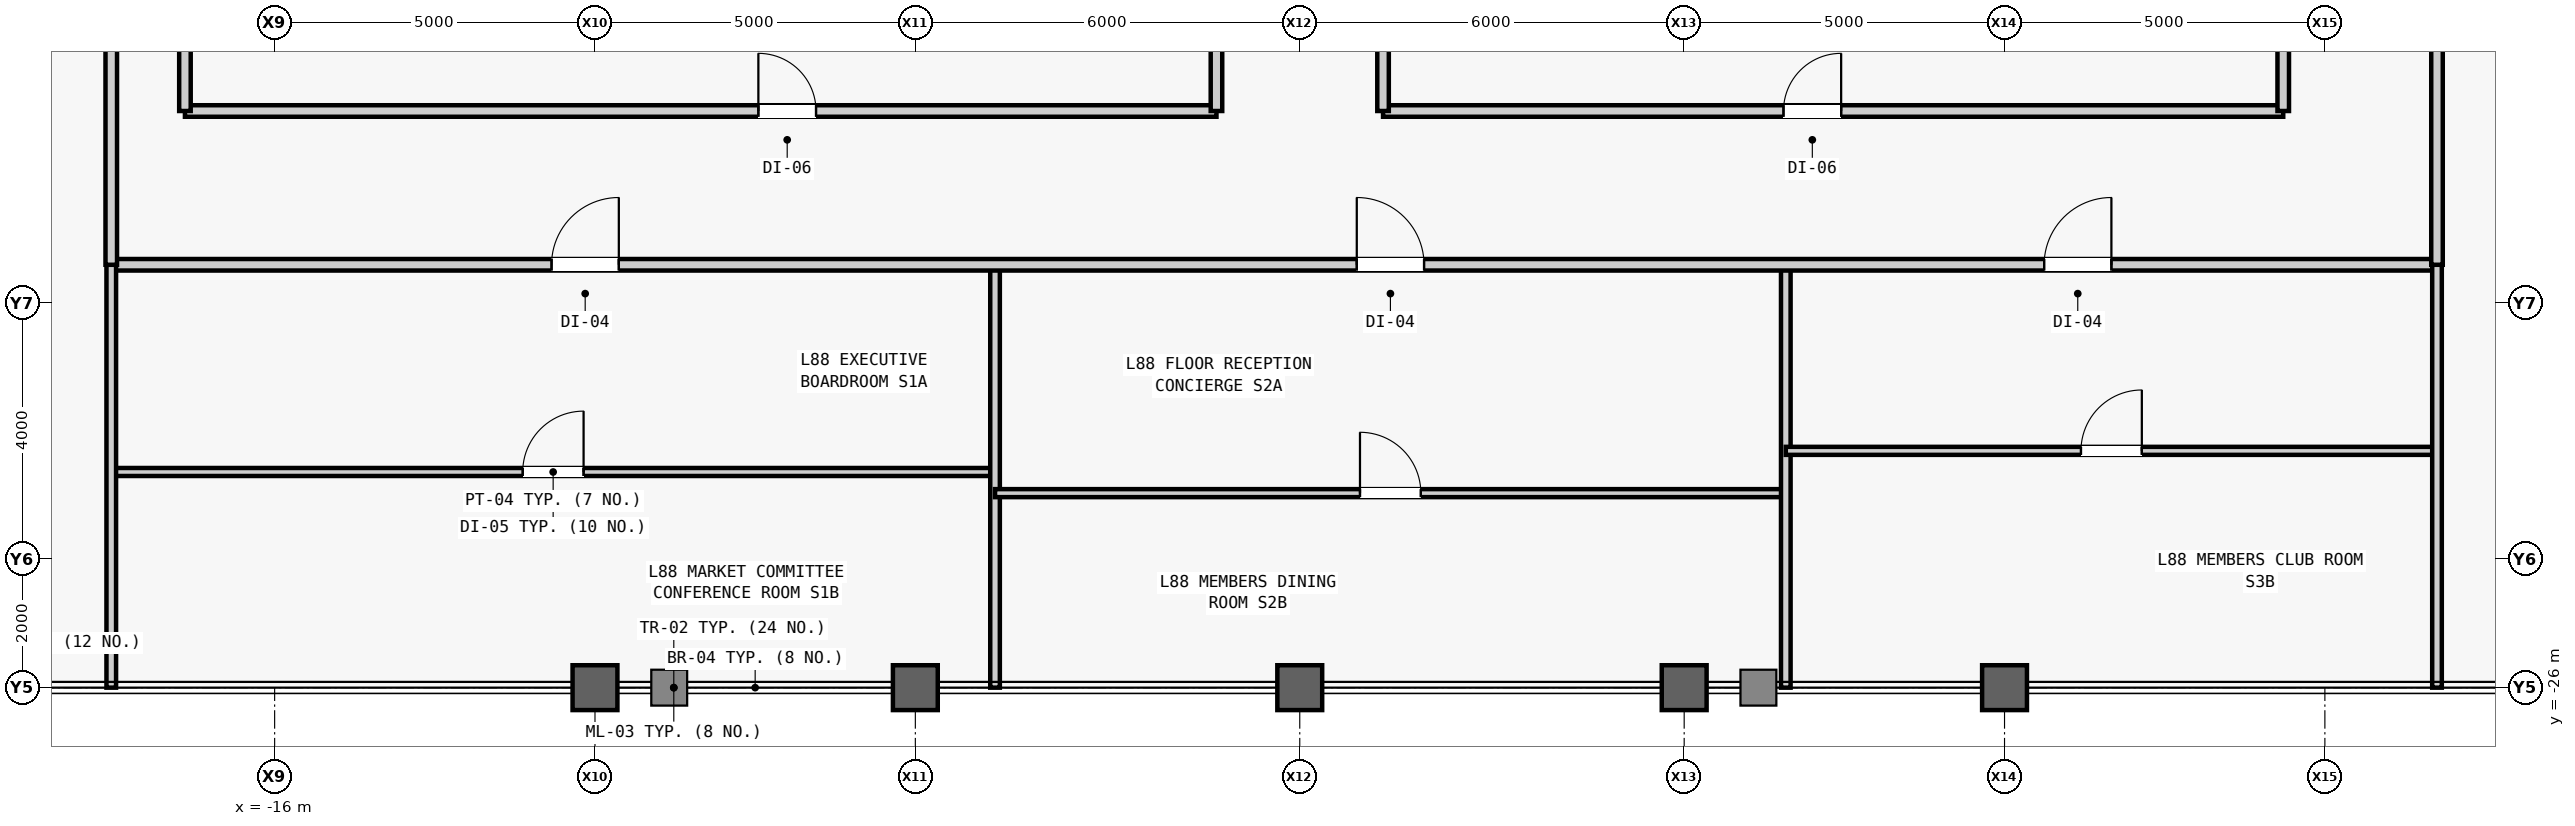
"""IFC4 building model, lengths in metres.
Left out: names, types, materials, properties, quantities, classifications, styles, units other than length and angle.
Written with IfcOpenShell. Run it as: python <this file> out.ifc"""

import sys

from ifc_helpers import new_model, si_unit, direction, frame, frame_2d, origin, origin_2d, place, context, subcontext, project, spatial, rectangle, hollow_rectangle, extrude, source, transform, mapped, element, fill, save


model = new_model("IFC4")
c1 = context("Model", 3, precision=1e-05, world=origin(), true_north=direction((0.0, 1.0)))
c2 = subcontext(c1, "Body", "Model", "MODEL_VIEW")
j1 = project(units=[si_unit("LENGTHUNIT", "METRE"), si_unit("PLANEANGLEUNIT", "RADIAN")], contexts=[c1])
p1 = place(None, origin())
s1 = spatial("IfcSite", under=j1, at=p1, CompositionType="ELEMENT")
p2 = place(p1, origin())
s2 = spatial("IfcBuilding", under=s1, at=p2, CompositionType="ELEMENT")
p3 = place(p2, frame((0.0, 0.0, 370.3)))
s3 = spatial("IfcBuildingStorey", under=s2, at=p3, CompositionType="ELEMENT", Elevation=370.3)
m1 = source(origin(), c2, "Body", "SweptSolid", [
    extrude(hollow_rectangle(XDim=0.7, YDim=0.7, WallThickness=0.04, at=origin_2d()), origin(), (0.0, 0.0, 1.0), 5.2),
])
for number, where, z_axis, x_axis in (
    (1, (-11.0, -26.0, 0.0), (0.0, 0.0, 1.0), (1.0, 0.0, 0.0)),
    (2, (-6.0, -26.0, 0.0), (0.0, 0.0, 1.0), (1.0, 0.0, 0.0)),
    (3, (0.0, -26.0, 0.0), (0.0, 0.0, 1.0), (1.0, 0.0, 0.0)),
    (4, (6.0, -26.0, 0.0), (0.0, 0.0, 1.0), (1.0, 0.0, 0.0)),
    (5, (11.0, -26.0, 0.0), (0.0, 0.0, 1.0), (1.0, 0.0, 0.0)),
):
    element("IfcColumn", number, at=place(p3, frame(where, z_axis=z_axis, x_axis=x_axis)), inside=s3, PredefinedType="COLUMN", context=c2, shape_type="MappedRepresentation", body=[
        mapped(m1, transform((0.0, 0.0, 0.0), scale=1.0)),
    ])
m2 = source(origin(), c2, "Body", "SweptSolid", [
    extrude(rectangle(XDim=16.1, YDim=0.18, at=frame_2d((8.05, 0.0))), origin(), (0.0, 0.0, 1.0), 4.6),
])
p4 = place(p3, frame((-17.4, -17.0, 0.0), z_axis=(0.0, 0.0, 1.0), x_axis=(1.0, 0.0, 0.0)))
e6 = element("IfcWall", 6, at=p4, inside=s3, PredefinedType="PARTITIONING", context=c2, shape_type="MappedRepresentation", body=[
    mapped(m2, transform((0.0, 0.0, 0.0), scale=1.0)),
])
m3 = source(origin(), c2, "Body", "SweptSolid", [
    extrude(rectangle(XDim=0.9, YDim=2.15, at=frame_2d((0.45, 1.075))), frame((0.0, 0.1, 0.0), z_axis=(0.0, -1.0, 0.0), x_axis=(1.0, 0.0, 0.0)), (0.0, 0.0, 1.0), 0.2),
])
p5 = place(p4, frame((8.95, 0.0, 0.0)))
e7 = element("IfcOpeningElement", 7, at=p5, cuts=e6, PredefinedType="OPENING", context=c2, shape_type="MappedRepresentation", body=[
    mapped(m3, transform((0.0, 0.0, 0.0), scale=1.0)),
])
m4 = source(origin(), c2, "Body", "SweptSolid", [
    extrude(rectangle(XDim=7.2, YDim=0.18, at=frame_2d((3.6, 0.0))), origin(), (0.0, 0.0, 1.0), 4.6),
])
p6 = place(p3, frame((-17.4, -17.0, 0.0), z_axis=(0.0, 0.0, 1.0), x_axis=(0.0, 1.0, 0.0)))
e8 = element("IfcWall", 8, at=p6, inside=s3, PredefinedType="PARTITIONING", context=c2, shape_type="MappedRepresentation", body=[
    mapped(m4, transform((0.0, 0.0, 0.0), scale=1.0)),
])
m5 = source(origin(), c2, "Body", "SweptSolid", [
    extrude(rectangle(XDim=6.0, YDim=0.18, at=frame_2d((3.0, 0.0))), origin(), (0.0, 0.0, 1.0), 4.6),
])
p7 = place(p3, frame((-1.3, -17.0, 0.0), z_axis=(0.0, 0.0, 1.0), x_axis=(0.0, 1.0, 0.0)))
e9 = element("IfcWall", 9, at=p7, inside=s3, PredefinedType="PARTITIONING", context=c2, shape_type="MappedRepresentation", body=[
    mapped(m5, transform((0.0, 0.0, 0.0), scale=1.0)),
])
m6 = source(origin(), c2, "Body", "SweptSolid", [
    extrude(rectangle(XDim=14.05, YDim=0.18, at=frame_2d((7.025, 0.0))), origin(), (0.0, 0.0, 1.0), 4.6),
])
p8 = place(p3, frame((1.3, -17.0, 0.0), z_axis=(0.0, 0.0, 1.0), x_axis=(1.0, 0.0, 0.0)))
e10 = element("IfcWall", 10, at=p8, inside=s3, PredefinedType="PARTITIONING", context=c2, shape_type="MappedRepresentation", body=[
    mapped(m6, transform((0.0, 0.0, 0.0), scale=1.0)),
])
p9 = place(p8, frame((6.25, 0.0, 0.0)))
e11 = element("IfcOpeningElement", 11, at=p9, cuts=e10, PredefinedType="OPENING", context=c2, shape_type="MappedRepresentation", body=[
    mapped(m3, transform((0.0, 0.0, 0.0), scale=1.0)),
])
p10 = place(p3, frame((1.3, -17.0, 0.0), z_axis=(0.0, 0.0, 1.0), x_axis=(0.0, 1.0, 0.0)))
e12 = element("IfcWall", 12, at=p10, inside=s3, PredefinedType="PARTITIONING", context=c2, shape_type="MappedRepresentation", body=[
    mapped(m5, transform((0.0, 0.0, 0.0), scale=1.0)),
])
m7 = source(origin(), c2, "Body", "SweptSolid", [
    extrude(rectangle(XDim=6.5, YDim=0.18, at=frame_2d((3.25, 0.0))), origin(), (0.0, 0.0, 1.0), 4.6),
])
p11 = place(p3, frame((15.35, -17.0, 0.0), z_axis=(0.0, 0.0, 1.0), x_axis=(0.0, 1.0, 0.0)))
e13 = element("IfcWall", 13, at=p11, inside=s3, PredefinedType="PARTITIONING", context=c2, shape_type="MappedRepresentation", body=[
    mapped(m7, transform((0.0, 0.0, 0.0), scale=1.0)),
])
m8 = source(origin(), c2, "Body", "SweptSolid", [
    extrude(rectangle(XDim=13.794, YDim=0.125, at=frame_2d((6.897, 0.0))), origin(), (0.0, 0.0, 1.0), 4.6),
])
p12 = place(p3, frame((-18.55, -22.634, 0.0), z_axis=(0.0, 0.0, 1.0), x_axis=(1.0, 0.0, 0.0)))
e14 = element("IfcWall", 14, at=p12, inside=s3, PredefinedType="PARTITIONING", context=c2, shape_type="MappedRepresentation", body=[
    mapped(m8, transform((0.0, 0.0, 0.0), scale=1.0)),
])
m9 = source(origin(), c2, "Body", "SweptSolid", [
    extrude(rectangle(XDim=0.95, YDim=2.15, at=frame_2d((0.475, 1.075))), frame((0.0, 0.073, 0.0), z_axis=(0.0, -1.0, 0.0), x_axis=(1.0, 0.0, 0.0)), (0.0, 0.0, 1.0), 0.145),
])
p13 = place(p12, frame((6.422, 0.0, 0.0)))
e15 = element("IfcOpeningElement", 15, at=p13, cuts=e14, PredefinedType="OPENING", context=c2, shape_type="MappedRepresentation", body=[
    mapped(m9, transform((0.0, 0.0, 0.0), scale=1.0)),
])
m10 = source(origin(), c2, "Body", "SweptSolid", [
    extrude(rectangle(XDim=6.6, YDim=0.15, at=frame_2d((3.3, 0.0))), origin(), (0.0, 0.0, 1.0), 4.6),
])
p14 = place(p3, frame((-4.756, -26.0, 0.0), z_axis=(0.0, 0.0, 1.0), x_axis=(0.0, 1.0, 0.0)))
e16 = element("IfcWall", 16, at=p14, inside=s3, PredefinedType="PARTITIONING", context=c2, shape_type="MappedRepresentation", body=[
    mapped(m10, transform((0.0, 0.0, 0.0), scale=1.0)),
])
m11 = source(origin(), c2, "Body", "SweptSolid", [
    extrude(rectangle(XDim=12.342, YDim=0.125, at=frame_2d((6.171, 0.0))), origin(), (0.0, 0.0, 1.0), 4.6),
])
p15 = place(p3, frame((-4.756, -22.964, 0.0), z_axis=(0.0, 0.0, 1.0), x_axis=(1.0, 0.0, 0.0)))
e17 = element("IfcWall", 17, at=p15, inside=s3, PredefinedType="PARTITIONING", context=c2, shape_type="MappedRepresentation", body=[
    mapped(m11, transform((0.0, 0.0, 0.0), scale=1.0)),
])
p16 = place(p15, frame((5.696, 0.0, 0.0)))
e18 = element("IfcOpeningElement", 18, at=p16, cuts=e17, PredefinedType="OPENING", context=c2, shape_type="MappedRepresentation", body=[
    mapped(m9, transform((0.0, 0.0, 0.0), scale=1.0)),
])
p17 = place(p3, frame((7.586, -26.0, 0.0), z_axis=(0.0, 0.0, 1.0), x_axis=(0.0, 1.0, 0.0)))
e19 = element("IfcWall", 19, at=p17, inside=s3, PredefinedType="PARTITIONING", context=c2, shape_type="MappedRepresentation", body=[
    mapped(m10, transform((0.0, 0.0, 0.0), scale=1.0)),
])
m12 = source(origin(), c2, "Body", "SweptSolid", [
    extrude(rectangle(XDim=10.164, YDim=0.125, at=frame_2d((5.082, 0.0))), origin(), (0.0, 0.0, 1.0), 4.6),
])
p18 = place(p3, frame((7.586, -22.304, 0.0), z_axis=(0.0, 0.0, 1.0), x_axis=(1.0, 0.0, 0.0)))
e20 = element("IfcWall", 20, at=p18, inside=s3, PredefinedType="PARTITIONING", context=c2, shape_type="MappedRepresentation", body=[
    mapped(m12, transform((0.0, 0.0, 0.0), scale=1.0)),
])
p19 = place(p18, frame((4.607, 0.0, 0.0)))
e21 = element("IfcOpeningElement", 21, at=p19, cuts=e20, PredefinedType="OPENING", context=c2, shape_type="MappedRepresentation", body=[
    mapped(m9, transform((0.0, 0.0, 0.0), scale=1.0)),
])
m13 = source(origin(), c2, "Body", "SweptSolid", [
    extrude(rectangle(XDim=36.3, YDim=0.18, at=frame_2d((18.15, 0.0))), origin(), (0.0, 0.0, 1.0), 4.253),
])
p20 = place(p3, frame((-18.55, -19.4, 0.0), z_axis=(0.0, 0.0, 1.0), x_axis=(1.0, 0.0, 0.0)))
e22 = element("IfcWall", 22, at=p20, inside=s3, PredefinedType="PARTITIONING", context=c2, shape_type="MappedRepresentation", body=[
    mapped(m13, transform((0.0, 0.0, 0.0), scale=1.0)),
])
m14 = source(origin(), c2, "Body", "SweptSolid", [
    extrude(rectangle(XDim=1.05, YDim=2.2, at=frame_2d((0.525, 1.1))), frame((0.0, 0.1, 0.0), z_axis=(0.0, -1.0, 0.0), x_axis=(1.0, 0.0, 0.0)), (0.0, 0.0, 1.0), 0.2),
])
p21 = place(p20, frame((6.872, 0.0, 0.0)))
e23 = element("IfcOpeningElement", 23, at=p21, cuts=e22, PredefinedType="OPENING", context=c2, shape_type="MappedRepresentation", body=[
    mapped(m14, transform((0.0, 0.0, 0.0), scale=1.0)),
])
p22 = place(p20, frame((19.44, 0.0, 0.0)))
e24 = element("IfcOpeningElement", 24, at=p22, cuts=e22, PredefinedType="OPENING", context=c2, shape_type="MappedRepresentation", body=[
    mapped(m14, transform((0.0, 0.0, 0.0), scale=1.0)),
])
p23 = place(p20, frame((30.168, 0.0, 0.0)))
e25 = element("IfcOpeningElement", 25, at=p23, cuts=e22, PredefinedType="OPENING", context=c2, shape_type="MappedRepresentation", body=[
    mapped(m14, transform((0.0, 0.0, 0.0), scale=1.0)),
])
p24 = place(p3, frame((-18.55, -26.0, 0.0), z_axis=(0.0, 0.0, 1.0), x_axis=(0.0, 1.0, 0.0)))
e26 = element("IfcWall", 26, at=p24, inside=s3, PredefinedType="PARTITIONING", context=c2, shape_type="MappedRepresentation", body=[
    mapped(m10, transform((0.0, 0.0, 0.0), scale=1.0)),
])
m15 = source(origin(), c2, "Body", "SweptSolid", [
    extrude(rectangle(XDim=6.6, YDim=0.15, at=frame_2d((3.3, 0.0))), origin(), (0.0, 0.0, 1.0), 2.8),
])
p25 = place(p3, frame((17.75, -26.0, 0.0), z_axis=(0.0, 0.0, 1.0), x_axis=(0.0, 1.0, 0.0)))
e27 = element("IfcWall", 27, at=p25, inside=s3, PredefinedType="PARTITIONING", context=c2, shape_type="MappedRepresentation", body=[
    mapped(m15, transform((0.0, 0.0, 0.0), scale=1.0)),
])
m16 = source(origin(), c2, "Body", "SweptSolid", [
    extrude(rectangle(XDim=39.4, YDim=0.18, at=frame_2d((19.7, 0.0))), origin(), (0.0, 0.0, 1.0), 4.6),
])
p26 = place(p3, frame((-18.55, -19.4, 0.0), z_axis=(0.0, 0.0, 1.0), x_axis=(0.0, 1.0, 0.0)))
e28 = element("IfcWall", 28, at=p26, inside=s3, PredefinedType="PARTITIONING", context=c2, shape_type="MappedRepresentation", body=[
    mapped(m16, transform((0.0, 0.0, 0.0), scale=1.0)),
])
m17 = source(origin(), c2, "Body", "SweptSolid", [
    extrude(rectangle(XDim=0.95, YDim=2.15, at=frame_2d((0.475, 1.075))), frame((0.0, 0.1, 0.0), z_axis=(0.0, -1.0, 0.0), x_axis=(1.0, 0.0, 0.0)), (0.0, 0.0, 1.0), 0.2),
])
p27 = place(p26, frame((10.375, 0.0, 0.0)))
e29 = element("IfcOpeningElement", 29, at=p27, cuts=e28, PredefinedType="OPENING", context=c2, shape_type="MappedRepresentation", body=[
    mapped(m17, transform((0.0, 0.0, 0.0), scale=1.0)),
])
p28 = place(p26, frame((26.075, 0.0, 0.0)))
e30 = element("IfcOpeningElement", 30, at=p28, cuts=e28, PredefinedType="OPENING", context=c2, shape_type="MappedRepresentation", body=[
    mapped(m17, transform((0.0, 0.0, 0.0), scale=1.0)),
])
m18 = source(origin(), c2, "Body", "SweptSolid", [
    extrude(rectangle(XDim=39.4, YDim=0.18, at=frame_2d((19.7, 0.0))), origin(), (0.0, 0.0, 1.0), 2.8),
])
p29 = place(p3, frame((17.75, -19.4, 0.0), z_axis=(0.0, 0.0, 1.0), x_axis=(0.0, 1.0, 0.0)))
e31 = element("IfcWall", 31, at=p29, inside=s3, PredefinedType="PARTITIONING", context=c2, shape_type="MappedRepresentation", body=[
    mapped(m18, transform((0.0, 0.0, 0.0), scale=1.0)),
])
p30 = place(p29, frame((17.225, 0.0, 0.0)))
e32 = element("IfcOpeningElement", 32, at=p30, cuts=e31, PredefinedType="OPENING", context=c2, shape_type="MappedRepresentation", body=[
    mapped(m17, transform((0.0, 0.0, 0.0), scale=1.0)),
])
m19 = source(origin(), c2, "Body", "SweptSolid", [
    extrude(rectangle(XDim=0.9, YDim=2.15, at=frame_2d((0.45, 1.075))), frame((0.0, 0.025, 0.0), z_axis=(0.0, -1.0, 0.0), x_axis=(1.0, 0.0, 0.0)), (0.0, 0.0, 1.0), 0.05),
])
p31 = place(p5, origin())
e33 = element("IfcDoor", 33, at=p31, inside=s3, OperationType="SINGLE_SWING_LEFT", PredefinedType="DOOR", context=c2, shape_type="MappedRepresentation", body=[
    mapped(m19, transform((0.0, 0.0, 0.0), scale=1.0)),
])
fill(e7, e33)
p32 = place(p9, origin())
e34 = element("IfcDoor", 34, at=p32, inside=s3, OperationType="SINGLE_SWING_RIGHT", PredefinedType="DOOR", context=c2, shape_type="MappedRepresentation", body=[
    mapped(m19, transform((0.0, 0.0, 0.0), scale=1.0)),
])
fill(e11, e34)
m20 = source(origin(), c2, "Body", "SweptSolid", [
    extrude(rectangle(XDim=0.95, YDim=2.15, at=frame_2d((0.475, 1.075))), frame((0.0, 0.025, 0.0), z_axis=(0.0, -1.0, 0.0), x_axis=(1.0, 0.0, 0.0)), (0.0, 0.0, 1.0), 0.05),
])
p33 = place(p13, origin())
e35 = element("IfcDoor", 35, at=p33, inside=s3, OperationType="SINGLE_SWING_RIGHT", PredefinedType="DOOR", context=c2, shape_type="MappedRepresentation", body=[
    mapped(m20, transform((0.0, 0.0, 0.0), scale=1.0)),
])
fill(e15, e35)
p34 = place(p16, origin())
e36 = element("IfcDoor", 36, at=p34, inside=s3, OperationType="SINGLE_SWING_LEFT", PredefinedType="DOOR", context=c2, shape_type="MappedRepresentation", body=[
    mapped(m20, transform((0.0, 0.0, 0.0), scale=1.0)),
])
fill(e18, e36)
p35 = place(p19, origin())
e37 = element("IfcDoor", 37, at=p35, inside=s3, OperationType="SINGLE_SWING_RIGHT", PredefinedType="DOOR", context=c2, shape_type="MappedRepresentation", body=[
    mapped(m20, transform((0.0, 0.0, 0.0), scale=1.0)),
])
fill(e21, e37)
m21 = source(origin(), c2, "Body", "SweptSolid", [
    extrude(rectangle(XDim=1.05, YDim=2.2, at=frame_2d((0.525, 1.1))), frame((0.0, 0.025, 0.0), z_axis=(0.0, -1.0, 0.0), x_axis=(1.0, 0.0, 0.0)), (0.0, 0.0, 1.0), 0.05),
])
p36 = place(p21, origin())
e38 = element("IfcDoor", 38, at=p36, inside=s3, OperationType="SINGLE_SWING_RIGHT", PredefinedType="DOOR", context=c2, shape_type="MappedRepresentation", body=[
    mapped(m21, transform((0.0, 0.0, 0.0), scale=1.0)),
])
fill(e23, e38)
p37 = place(p22, origin())
e39 = element("IfcDoor", 39, at=p37, inside=s3, OperationType="SINGLE_SWING_LEFT", PredefinedType="DOOR", context=c2, shape_type="MappedRepresentation", body=[
    mapped(m21, transform((0.0, 0.0, 0.0), scale=1.0)),
])
fill(e24, e39)
p38 = place(p23, origin())
e40 = element("IfcDoor", 40, at=p38, inside=s3, OperationType="SINGLE_SWING_RIGHT", PredefinedType="DOOR", context=c2, shape_type="MappedRepresentation", body=[
    mapped(m21, transform((0.0, 0.0, 0.0), scale=1.0)),
])
fill(e25, e40)
save(model, sys.argv[1])
